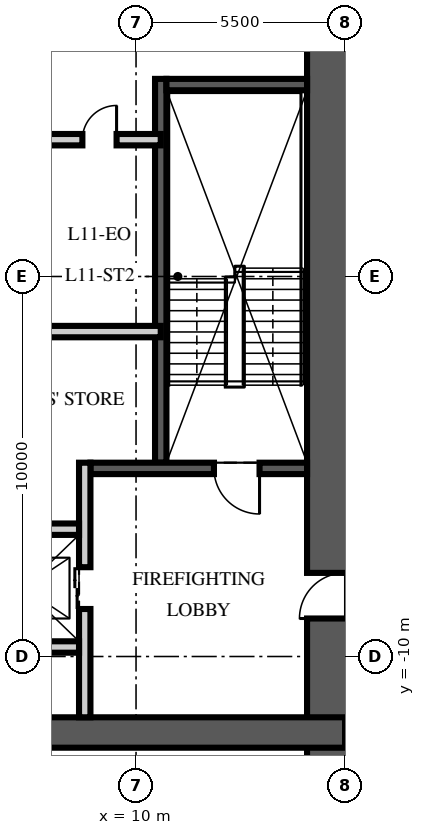
"""IFC4 building model, lengths in metres.
Left out: names, types, materials, properties, quantities, classifications, styles, units other than length and angle.
Written with IfcOpenShell. Run it as: python <this file> out.ifc"""

import sys

from ifc_helpers import new_model, si_unit, direction, frame, frame_2d, origin, place, context, subcontext, project, spatial, rectangle, extrude, element, fill, save


model = new_model("IFC4")
c1 = context("Model", 3, precision=1e-05, world=origin(), true_north=direction((0.0, 1.0)))
c2 = subcontext(c1, "Body", "Model", "MODEL_VIEW")
j1 = project(units=[si_unit("LENGTHUNIT", "METRE"), si_unit("PLANEANGLEUNIT", "RADIAN")], contexts=[c1])
p1 = place(None, origin())
s1 = spatial("IfcSite", under=j1, at=p1, CompositionType="ELEMENT")
p2 = place(p1, origin())
s2 = spatial("IfcBuilding", under=s1, at=p2, CompositionType="ELEMENT")
p3 = place(p2, frame((0.0, 0.0, 47.25)))
s3 = spatial("IfcBuildingStorey", under=s2, at=p3, CompositionType="ELEMENT", Elevation=47.25)
p4 = place(p3, frame((15.5, -15.5, -0.25), z_axis=(0.0, 0.0, 1.0), x_axis=(0.0, 1.0, 0.0)))
e1 = element("IfcWall", 1, at=p4, inside=s3, PredefinedType="SHEAR", context=c2, shape_type="SweptSolid", body=[
    extrude(rectangle(XDim=31.0, YDim=2.0, at=frame_2d((15.5, 0.0))), origin(), (0.0, 0.0, 1.0), 3.75),
])
p5 = place(p4, frame((6.5, 0.0, 0.25)))
e2 = element("IfcOpeningElement", 2, at=p5, cuts=e1, PredefinedType="OPENING", context=c2, shape_type="SweptSolid", body=[
    extrude(rectangle(XDim=1.2, YDim=2.1, at=frame_2d((0.6, 1.05))), frame((0.0, 1.01, 0.0), z_axis=(0.0, -1.0, 0.0), x_axis=(1.0, 0.0, 0.0)), (0.0, 0.0, 1.0), 2.02),
])
p6 = place(p4, frame((23.0, 0.0, 0.25)))
e3 = element("IfcOpeningElement", 3, at=p6, cuts=e1, PredefinedType="OPENING", context=c2, shape_type="SweptSolid", body=[
    extrude(rectangle(XDim=1.8, YDim=2.1, at=frame_2d((0.9, 1.05))), frame((0.0, 1.01, 0.0), z_axis=(0.0, -1.0, 0.0), x_axis=(1.0, 0.0, 0.0)), (0.0, 0.0, 1.0), 2.02),
])
p7 = place(p3, frame((-15.5, -12.0, -0.25), z_axis=(0.0, 0.0, 1.0), x_axis=(1.0, 0.0, 0.0)))
e4 = element("IfcWall", 4, at=p7, inside=s3, PredefinedType="SHEAR", context=c2, shape_type="SweptSolid", body=[
    extrude(rectangle(XDim=31.0, YDim=0.8, at=frame_2d((15.5, 0.0))), origin(), (0.0, 0.0, 1.0), 3.75),
])
p8 = place(p3, frame((10.65, -4.9, 0.0), z_axis=(0.0, 0.0, 1.0), x_axis=(0.0, 1.0, 0.0)))
e5 = element("IfcWall", 5, at=p8, inside=s3, PredefinedType="SOLIDWALL", context=c2, shape_type="SweptSolid", body=[
    extrude(rectangle(XDim=10.1, YDim=0.3, at=frame_2d((5.05, 0.0))), origin(), (0.0, 0.0, 1.0), 3.5),
])
p9 = place(p3, frame((14.5, -5.05, 0.0), z_axis=(0.0, 0.0, 1.0), x_axis=(-1.0, 0.0, 0.0)))
e6 = element("IfcWall", 6, at=p9, inside=s3, PredefinedType="SOLIDWALL", context=c2, shape_type="SweptSolid", body=[
    extrude(rectangle(XDim=5.7, YDim=0.3, at=frame_2d((2.85, 0.0))), origin(), (0.0, 0.0, 1.0), 3.5),
])
p10 = place(p9, frame((1.25, 0.0, 0.0)))
e7 = element("IfcOpeningElement", 7, at=p10, cuts=e6, PredefinedType="OPENING", context=c2, shape_type="SweptSolid", body=[
    extrude(rectangle(XDim=1.2, YDim=2.1, at=frame_2d((0.6, 1.05))), frame((0.0, 0.16, 0.0), z_axis=(0.0, -1.0, 0.0), x_axis=(1.0, 0.0, 0.0)), (0.0, 0.0, 1.0), 0.32),
])
p11 = place(p3, frame((14.5, 5.05, 0.0), z_axis=(0.0, 0.0, 1.0), x_axis=(-1.0, 0.0, 0.0)))
e8 = element("IfcWall", 8, at=p11, inside=s3, PredefinedType="SOLIDWALL", context=c2, shape_type="SweptSolid", body=[
    extrude(rectangle(XDim=3.7, YDim=0.3, at=frame_2d((1.85, 0.0))), origin(), (0.0, 0.0, 1.0), 3.5),
])
p12 = place(p3, frame((8.65, -11.6, 0.0), z_axis=(0.0, 0.0, 1.0), x_axis=(0.0, 1.0, 0.0)))
e9 = element("IfcWall", 9, at=p12, inside=s3, PredefinedType="PARTITIONING", context=c2, shape_type="SweptSolid", body=[
    extrude(rectangle(XDim=6.7, YDim=0.3, at=frame_2d((3.35, 0.0))), origin(), (0.0, 0.0, 1.0), 3.5),
])
p13 = place(p12, frame((2.85, 0.0, 0.0)))
e10 = element("IfcOpeningElement", 10, at=p13, cuts=e9, PredefinedType="OPENING", context=c2, shape_type="SweptSolid", body=[
    extrude(rectangle(XDim=1.1, YDim=2.1, at=frame_2d((0.55, 1.05))), frame((0.0, 0.16, 0.0), z_axis=(0.0, -1.0, 0.0), x_axis=(1.0, 0.0, 0.0)), (0.0, 0.0, 1.0), 0.32),
])
p14 = place(p3, frame((-8.5, -6.65, 0.0), z_axis=(0.0, 0.0, 1.0), x_axis=(1.0, 0.0, 0.0)))
e11 = element("IfcWall", 11, at=p14, inside=s3, PredefinedType="PARTITIONING", context=c2, shape_type="SweptSolid", body=[
    extrude(rectangle(XDim=17.0, YDim=0.3, at=frame_2d((8.5, 0.0))), origin(), (0.0, 0.0, 1.0), 3.5),
])
p15 = place(p14, frame((7.8, 0.0, 0.0)))
e12 = element("IfcOpeningElement", 12, at=p15, cuts=e11, PredefinedType="OPENING", context=c2, shape_type="SweptSolid", body=[
    extrude(rectangle(XDim=1.3, YDim=2.4, at=frame_2d((0.65, 1.2))), frame((0.0, 0.16, 0.0), z_axis=(0.0, -1.0, 0.0), x_axis=(1.0, 0.0, 0.0)), (0.0, 0.0, 1.0), 0.32),
])
p16 = place(p14, frame((5.65, 0.0, 0.0)))
e13 = element("IfcOpeningElement", 13, at=p16, cuts=e11, PredefinedType="OPENING", context=c2, shape_type="SweptSolid", body=[
    extrude(rectangle(XDim=0.9, YDim=2.1, at=frame_2d((0.45, 1.05))), frame((0.0, 0.16, 0.0), z_axis=(0.0, -1.0, 0.0), x_axis=(1.0, 0.0, 0.0)), (0.0, 0.0, 1.0), 0.32),
])
p17 = place(p14, frame((10.4, 0.0, 0.0)))
e14 = element("IfcOpeningElement", 14, at=p17, cuts=e11, PredefinedType="OPENING", context=c2, shape_type="SweptSolid", body=[
    extrude(rectangle(XDim=0.9, YDim=2.1, at=frame_2d((0.45, 1.05))), frame((0.0, 0.16, 0.0), z_axis=(0.0, -1.0, 0.0), x_axis=(1.0, 0.0, 0.0)), (0.0, 0.0, 1.0), 0.32),
])
p18 = place(p3, frame((5.6, -9.75, 0.0), z_axis=(0.0, 0.0, 1.0), x_axis=(1.0, 0.0, 0.0)))
e15 = element("IfcWall", 15, at=p18, inside=s3, PredefinedType="PARTITIONING", context=c2, shape_type="SweptSolid", body=[
    extrude(rectangle(XDim=2.9, YDim=0.3, at=frame_2d((1.45, 0.0))), origin(), (0.0, 0.0, 1.0), 3.5),
])
p19 = place(p3, frame((-10.65, 3.6, 0.0), z_axis=(0.0, 0.0, 1.0), x_axis=(1.0, 0.0, 0.0)))
e16 = element("IfcWall", 16, at=p19, inside=s3, PredefinedType="PARTITIONING", context=c2, shape_type="SweptSolid", body=[
    extrude(rectangle(XDim=21.3, YDim=0.3, at=frame_2d((10.65, 0.0))), origin(), (0.0, 0.0, 1.0), 3.5),
])
p20 = place(p19, frame((10.05, 0.0, 0.0)))
e17 = element("IfcOpeningElement", 17, at=p20, cuts=e16, PredefinedType="OPENING", context=c2, shape_type="SweptSolid", body=[
    extrude(rectangle(XDim=1.2, YDim=2.1, at=frame_2d((0.6, 1.05))), frame((0.0, 0.16, 0.0), z_axis=(0.0, -1.0, 0.0), x_axis=(1.0, 0.0, 0.0)), (0.0, 0.0, 1.0), 0.32),
])
p21 = place(p19, frame((19.238, 0.0, 0.0)))
e18 = element("IfcOpeningElement", 18, at=p21, cuts=e16, PredefinedType="OPENING", context=c2, shape_type="SweptSolid", body=[
    extrude(rectangle(XDim=0.9, YDim=2.1, at=frame_2d((0.45, 1.05))), frame((0.0, 0.16, 0.0), z_axis=(0.0, -1.0, 0.0), x_axis=(1.0, 0.0, 0.0)), (0.0, 0.0, 1.0), 0.32),
])
p22 = place(p3, frame((10.65, -1.45, 0.0), z_axis=(0.0, 0.0, 1.0), x_axis=(-1.0, 0.0, 0.0)))
e19 = element("IfcWall", 19, at=p22, inside=s3, PredefinedType="PARTITIONING", context=c2, shape_type="SweptSolid", body=[
    extrude(rectangle(XDim=6.45, YDim=0.3, at=frame_2d((3.225, 0.0))), origin(), (0.0, 0.0, 1.0), 3.5),
])
p23 = place(p10, origin())
e20 = element("IfcDoor", 20, at=p23, inside=s3, OperationType="SINGLE_SWING_LEFT", PredefinedType="DOOR", context=c2, shape_type="SweptSolid", body=[
    extrude(rectangle(XDim=1.2, YDim=2.1, at=frame_2d((0.6, 1.05))), frame((0.0, 0.025, 0.0), z_axis=(0.0, -1.0, 0.0), x_axis=(1.0, 0.0, 0.0)), (0.0, 0.0, 1.0), 0.05),
])
fill(e7, e20)
p24 = place(p5, origin())
e21 = element("IfcDoor", 21, at=p24, inside=s3, OperationType="SINGLE_SWING_LEFT", PredefinedType="DOOR", context=c2, shape_type="SweptSolid", body=[
    extrude(rectangle(XDim=1.2, YDim=2.1, at=frame_2d((0.6, 1.05))), frame((0.0, 0.025, 0.0), z_axis=(0.0, -1.0, 0.0), x_axis=(1.0, 0.0, 0.0)), (0.0, 0.0, 1.0), 0.05),
])
fill(e2, e21)
p25 = place(p13, origin())
e22 = element("IfcDoor", 22, at=p25, inside=s3, OperationType="DOUBLE_DOOR_SLIDING", PredefinedType="DOOR", context=c2, shape_type="SweptSolid", body=[
    extrude(rectangle(XDim=1.1, YDim=2.1, at=frame_2d((0.55, 1.05))), frame((0.0, 0.025, 0.0), z_axis=(0.0, -1.0, 0.0), x_axis=(1.0, 0.0, 0.0)), (0.0, 0.0, 1.0), 0.05),
])
fill(e10, e22)
p26 = place(p21, origin())
e23 = element("IfcDoor", 23, at=p26, inside=s3, OperationType="SINGLE_SWING_RIGHT", PredefinedType="DOOR", context=c2, shape_type="SweptSolid", body=[
    extrude(rectangle(XDim=0.9, YDim=2.1, at=frame_2d((0.45, 1.05))), frame((0.0, 0.025, 0.0), z_axis=(0.0, -1.0, 0.0), x_axis=(1.0, 0.0, 0.0)), (0.0, 0.0, 1.0), 0.05),
])
fill(e18, e23)
save(model, sys.argv[1])
